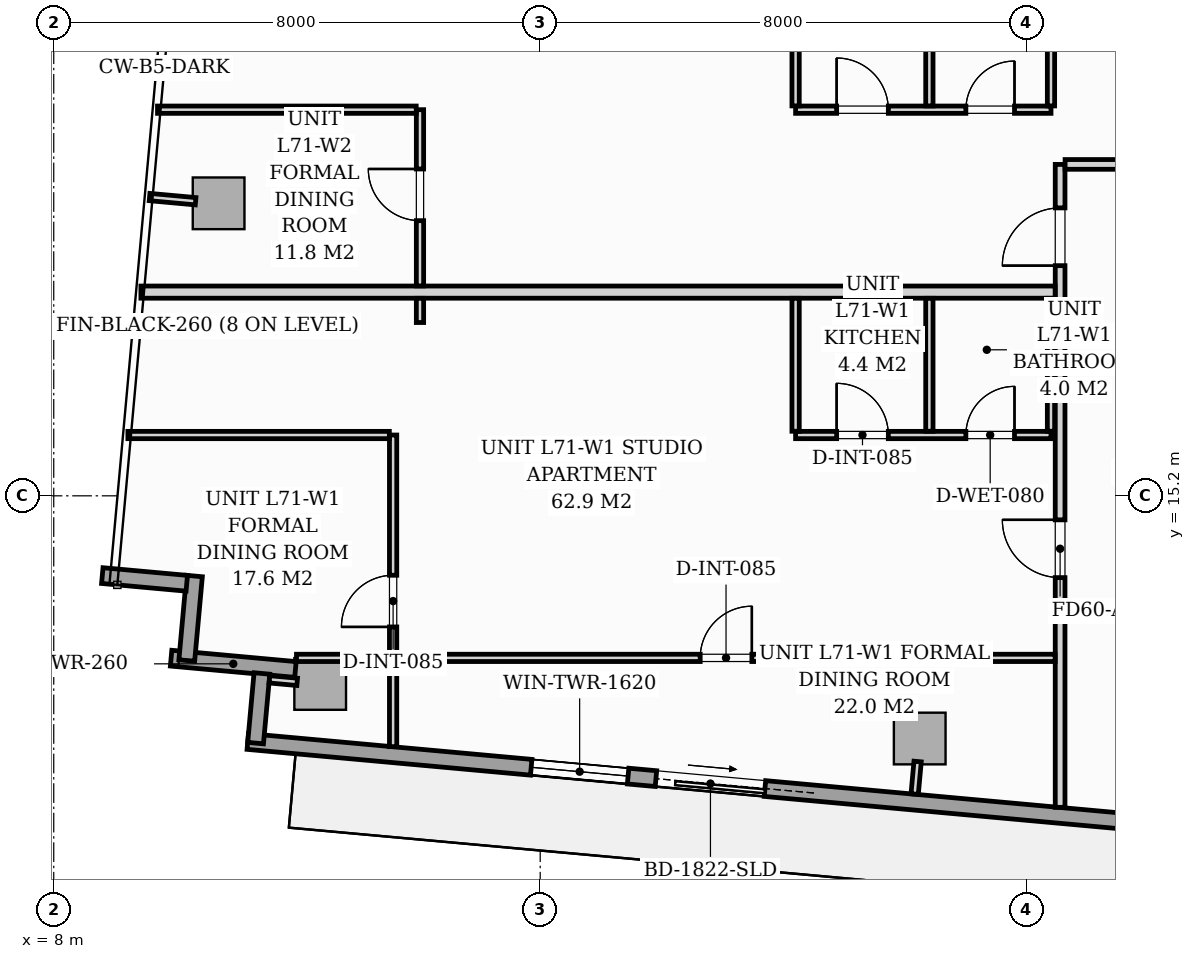
"""IFC4 building model, lengths in metres.
Left out: names, types, materials, properties, quantities, classifications, styles, units other than length and angle.
Written with IfcOpenShell. Run it as: python <this file> out.ifc"""

import sys

from ifc_helpers import new_model, si_unit, direction, frame, frame_2d, origin, origin_2d, place, context, subcontext, project, spatial, rectangle, extrude, source, transform, mapped, element, fill, save


model = new_model("IFC4")
c1 = context("Model", 3, precision=1e-05, world=origin(), true_north=direction((0.0, 1.0)))
c2 = subcontext(c1, "Body", "Model", "MODEL_VIEW")
j1 = project(units=[si_unit("LENGTHUNIT", "METRE"), si_unit("PLANEANGLEUNIT", "RADIAN")], contexts=[c1])
p1 = place(None, origin())
s1 = spatial("IfcSite", under=j1, at=p1, CompositionType="ELEMENT")
p2 = place(p1, origin())
s2 = spatial("IfcBuilding", under=s1, at=p2, CompositionType="ELEMENT")
p3 = place(p2, frame((0.0, 0.0, 246.3)))
s3 = spatial("IfcBuildingStorey", under=s2, at=p3, CompositionType="ELEMENT", Elevation=246.3)
m1 = source(origin(), c2, "Body", "SweptSolid", [
    extrude(rectangle(XDim=0.85, YDim=0.85, at=origin_2d()), origin(), (0.0, 0.0, 1.0), 3.296),
])
for number, where, z_axis, x_axis in (
    (1, (12.382, 12.106, 0.002), (0.0, 0.0, 1.0), (0.996, -0.091, 0.0)),
    (2, (22.241, 11.209, 0.002), (0.0, 0.0, 1.0), (0.996, -0.091, 0.0)),
    (3, (10.711, 20.01, 0.002), (0.0, 0.0, 1.0), (0.996, -0.091, 0.0)),
):
    element("IfcColumn", number, at=place(p3, frame(where, z_axis=z_axis, x_axis=x_axis)), inside=s3, PredefinedType="COLUMN", context=c2, shape_type="MappedRepresentation", body=[
        mapped(m1, transform((0.0, 0.0, 0.0), scale=1.0)),
    ])
p4 = place(p3, frame((11.975, 12.344, 0.0), z_axis=(0.0, 0.0, 1.0), x_axis=(-0.995885404354, 0.090621528316, 0.0)))
e4 = element("IfcWall", 4, at=p4, inside=s3, PredefinedType="STANDARD", context=c2, shape_type="SweptSolid", body=[
    extrude(rectangle(XDim=2.053, YDim=0.26, at=frame_2d((1.026, 0.0))), origin(), (0.0, 0.0, 1.0), 3.04),
])
p5 = place(p3, frame((10.188, 12.492, 0.0), z_axis=(0.0, 0.0, 1.0), x_axis=(0.090646191665, 0.995883159782, 0.0)))
e5 = element("IfcWall", 5, at=p5, inside=s3, PredefinedType="STANDARD", context=c2, shape_type="SweptSolid", body=[
    extrude(rectangle(XDim=1.395, YDim=0.26, at=frame_2d((0.698, 0.0))), origin(), (0.0, 0.0, 1.0), 3.04),
])
p6 = place(p3, frame((10.188, 13.762, 0.0), z_axis=(0.0, 0.0, 1.0), x_axis=(-0.995881721538, 0.090661991521, 0.0)))
e6 = element("IfcWall", 6, at=p6, inside=s3, PredefinedType="STANDARD", context=c2, shape_type="SweptSolid", body=[
    extrude(rectangle(XDim=1.395, YDim=0.26, at=frame_2d((0.698, 0.0))), origin(), (0.0, 0.0, 1.0), 3.04),
])
p7 = place(p3, frame((25.761, 9.834, 0.0), z_axis=(0.0, 0.0, 1.0), x_axis=(-0.995884584572, 0.090630536861, 0.0)))
e7 = element("IfcWall", 7, at=p7, inside=s3, PredefinedType="STANDARD", context=c2, shape_type="SweptSolid", body=[
    extrude(rectangle(XDim=14.63, YDim=0.26, at=frame_2d((7.315, 0.0))), origin(), (0.0, 0.0, 1.0), 3.04),
])
p8 = place(p7, frame((6.09, 0.0, 0.0)))
e8 = element("IfcOpeningElement", 8, at=p8, cuts=e7, PredefinedType="OPENING", context=c2, shape_type="SweptSolid", body=[
    extrude(rectangle(XDim=1.8, YDim=2.06, at=frame_2d((0.9, 1.03))), frame((0.0, 0.14, 0.0), z_axis=(0.0, -1.0, 0.0), x_axis=(1.0, 0.0, 0.0)), (0.0, 0.0, 1.0), 0.28),
])
p9 = place(p7, frame((8.35, 0.0, 0.65)))
e9 = element("IfcOpeningElement", 9, at=p9, cuts=e7, PredefinedType="OPENING", context=c2, shape_type="SweptSolid", body=[
    extrude(rectangle(XDim=1.6, YDim=1.5, at=frame_2d((0.8, 0.75))), frame((0.0, 0.14, 0.0), z_axis=(0.0, -1.0, 0.0), x_axis=(1.0, 0.0, 0.0)), (0.0, 0.0, 1.0), 0.28),
])
p10 = place(p3, frame((11.319, 11.134, 0.0), z_axis=(0.0, 0.0, 1.0), x_axis=(0.090650594353, 0.995882759035, 0.0)))
e10 = element("IfcWall", 10, at=p10, inside=s3, PredefinedType="STANDARD", context=c2, shape_type="SweptSolid", body=[
    extrude(rectangle(XDim=1.15, YDim=0.26, at=frame_2d((0.575, 0.0))), origin(), (0.0, 0.0, 1.0), 3.04),
])
p11 = place(p3, frame((24.55, 13.28, 0.0), z_axis=(0.0, 0.0, 1.0), x_axis=(1.0, 0.0, 0.0)))
e11 = element("IfcWall", 11, at=p11, inside=s3, PredefinedType="PARTITIONING", context=c2, shape_type="SweptSolid", body=[
    extrude(rectangle(XDim=22.9, YDim=0.16, at=frame_2d((11.45, 0.0))), origin(), (0.0, 0.0, 1.0), 2.556),
])
p12 = place(p11, frame((7.125, 0.0, 0.0)))
e12 = element("IfcOpeningElement", 12, at=p12, cuts=e11, PredefinedType="OPENING", context=c2, shape_type="SweptSolid", body=[
    extrude(rectangle(XDim=0.95, YDim=2.06, at=frame_2d((0.475, 1.03))), frame((0.0, 0.09, 0.0), z_axis=(0.0, -1.0, 0.0), x_axis=(1.0, 0.0, 0.0)), (0.0, 0.0, 1.0), 0.18),
])
p13 = place(p3, frame((24.55, 10.077, 0.0), z_axis=(0.0, 0.0, 1.0), x_axis=(0.0, 1.0, 0.0)))
e13 = element("IfcWall", 13, at=p13, inside=s3, PredefinedType="PARTITIONING", context=c2, shape_type="SweptSolid", body=[
    extrude(rectangle(XDim=3.121, YDim=0.16, at=frame_2d((1.561, 0.0))), origin(), (0.0, 0.0, 1.0), 3.04),
])
p14 = place(p3, frame((24.55, 13.362, 0.0), z_axis=(0.0, 0.0, 1.0), x_axis=(0.0, 1.0, 0.0)))
e14 = element("IfcWall", 14, at=p14, inside=s3, PredefinedType="PARTITIONING", context=c2, shape_type="SweptSolid", body=[
    extrude(rectangle(XDim=7.288, YDim=0.16, at=frame_2d((3.644, 0.0))), origin(), (0.0, 0.0, 1.0), 3.04),
])
p15 = place(p14, frame((0.493, 0.0, 0.0)))
e15 = element("IfcOpeningElement", 15, at=p15, cuts=e14, PredefinedType="OPENING", context=c2, shape_type="SweptSolid", body=[
    extrude(rectangle(XDim=0.95, YDim=2.06, at=frame_2d((0.475, 1.03))), frame((0.0, 0.09, 0.0), z_axis=(0.0, -1.0, 0.0), x_axis=(1.0, 0.0, 0.0)), (0.0, 0.0, 1.0), 0.18),
])
p16 = place(p14, frame((5.623, 0.0, 0.0)))
e16 = element("IfcOpeningElement", 16, at=p16, cuts=e14, PredefinedType="OPENING", context=c2, shape_type="SweptSolid", body=[
    extrude(rectangle(XDim=0.95, YDim=2.06, at=frame_2d((0.475, 1.03))), frame((0.0, 0.09, 0.0), z_axis=(0.0, -1.0, 0.0), x_axis=(1.0, 0.0, 0.0)), (0.0, 0.0, 1.0), 0.18),
])
p17 = place(p3, frame((24.632, 20.65, 0.0), z_axis=(0.0, 0.0, 1.0), x_axis=(1.0, 0.0, 0.0)))
e17 = element("IfcWall", 17, at=p17, inside=s3, PredefinedType="PARTITIONING", context=c2, shape_type="SweptSolid", body=[
    extrude(rectangle(XDim=1.566, YDim=0.16, at=frame_2d((0.783, 0.0))), origin(), (0.0, 0.0, 1.0), 3.04),
])
p18 = place(p3, frame((9.434, 18.55, 0.0), z_axis=(0.0, 0.0, 1.0), x_axis=(1.0, 0.0, 0.0)))
e18 = element("IfcWall", 18, at=p18, inside=s3, PredefinedType="PARTITIONING", context=c2, shape_type="SweptSolid", body=[
    extrude(rectangle(XDim=15.034, YDim=0.2, at=frame_2d((7.517, 0.0))), origin(), (0.0, 0.0, 1.0), 2.381),
])
p19 = place(p3, frame((20.2, 16.2, 0.0), z_axis=(0.0, 0.0, 1.0), x_axis=(1.0, 0.0, 0.0)))
e19 = element("IfcWall", 19, at=p19, inside=s3, PredefinedType="PARTITIONING", context=c2, shape_type="SweptSolid", body=[
    extrude(rectangle(XDim=4.2, YDim=0.12, at=frame_2d((2.1, 0.0))), origin(), (0.0, 0.0, 1.0), 3.04),
])
p20 = place(p19, frame((0.675, 0.0, 0.0)))
e20 = element("IfcOpeningElement", 20, at=p20, cuts=e19, PredefinedType="OPENING", context=c2, shape_type="SweptSolid", body=[
    extrude(rectangle(XDim=0.85, YDim=2.05, at=frame_2d((0.425, 1.025))), frame((0.0, 0.07, 0.0), z_axis=(0.0, -1.0, 0.0), x_axis=(1.0, 0.0, 0.0)), (0.0, 0.0, 1.0), 0.14),
])
p21 = place(p19, frame((2.8, 0.0, 0.0)))
e21 = element("IfcOpeningElement", 21, at=p21, cuts=e19, PredefinedType="OPENING", context=c2, shape_type="SweptSolid", body=[
    extrude(rectangle(XDim=0.8, YDim=2.02, at=frame_2d((0.4, 1.01))), frame((0.0, 0.07, 0.0), z_axis=(0.0, -1.0, 0.0), x_axis=(1.0, 0.0, 0.0)), (0.0, 0.0, 1.0), 0.14),
])
for number, where, z_axis, x_axis in (
    (22, (20.2, 16.262, 0.0), (0.0, 0.0, 1.0), (0.0, 1.0, 0.0)),
    (23, (22.4, 16.262, 0.0), (0.0, 0.0, 1.0), (0.0, 1.0, 0.0)),
    (24, (24.4, 16.262, 0.0), (0.0, 0.0, 1.0), (0.0, 1.0, 0.0)),
):
    element("IfcWall", number, at=place(p3, frame(where, z_axis=z_axis, x_axis=x_axis)), inside=s3, PredefinedType="PARTITIONING", context=c2, shape_type="SweptSolid", body=[
        extrude(rectangle(XDim=2.186, YDim=0.12, at=frame_2d((1.093, 0.0))), origin(), (0.0, 0.0, 1.0), 3.04),
    ])
p22 = place(p3, frame((13.581, 11.075, 0.0), z_axis=(0.0, 0.0, 1.0), x_axis=(0.0, 1.0, 0.0)))
e25 = element("IfcWall", 25, at=p22, inside=s3, PredefinedType="PARTITIONING", context=c2, shape_type="SweptSolid", body=[
    extrude(rectangle(XDim=5.125, YDim=0.12, at=frame_2d((2.562, 0.0))), origin(), (0.0, 0.0, 1.0), 3.04),
])
p23 = place(p22, frame((1.969, 0.0, 0.0)))
e26 = element("IfcOpeningElement", 26, at=p23, cuts=e25, PredefinedType="OPENING", context=c2, shape_type="SweptSolid", body=[
    extrude(rectangle(XDim=0.85, YDim=2.05, at=frame_2d((0.425, 1.025))), frame((0.0, 0.07, 0.0), z_axis=(0.0, -1.0, 0.0), x_axis=(1.0, 0.0, 0.0)), (0.0, 0.0, 1.0), 0.14),
])
p24 = place(p3, frame((9.22, 16.2, 0.0), z_axis=(0.0, 0.0, 1.0), x_axis=(1.0, 0.0, 0.0)))
e27 = element("IfcWall", 27, at=p24, inside=s3, PredefinedType="PARTITIONING", context=c2, shape_type="SweptSolid", body=[
    extrude(rectangle(XDim=4.299, YDim=0.12, at=frame_2d((2.149, 0.0))), origin(), (0.0, 0.0, 1.0), 3.04),
])
p25 = place(p3, frame((11.992, 12.535, 0.0), z_axis=(0.0, 0.0, 1.0), x_axis=(1.0, 0.0, 0.0)))
e28 = element("IfcWall", 28, at=p25, inside=s3, PredefinedType="PARTITIONING", context=c2, shape_type="SweptSolid", body=[
    extrude(rectangle(XDim=1.527, YDim=0.12, at=frame_2d((0.763, 0.0))), origin(), (0.0, 0.0, 1.0), 3.04),
])
p26 = place(p3, frame((13.643, 12.535, 0.0), z_axis=(0.0, 0.0, 1.0), x_axis=(1.0, 0.0, 0.0)))
e29 = element("IfcWall", 29, at=p26, inside=s3, PredefinedType="PARTITIONING", context=c2, shape_type="SweptSolid", body=[
    extrude(rectangle(XDim=10.825, YDim=0.12, at=frame_2d((5.413, 0.0))), origin(), (0.0, 0.0, 1.0), 3.04),
])
p27 = place(p26, frame((4.988, 0.0, 0.0)))
e30 = element("IfcOpeningElement", 30, at=p27, cuts=e29, PredefinedType="OPENING", context=c2, shape_type="SweptSolid", body=[
    extrude(rectangle(XDim=0.85, YDim=2.05, at=frame_2d((0.425, 1.025))), frame((0.0, 0.07, 0.0), z_axis=(0.0, -1.0, 0.0), x_axis=(1.0, 0.0, 0.0)), (0.0, 0.0, 1.0), 0.14),
])
p28 = place(p3, frame((20.2, 21.55, 0.0), z_axis=(0.0, 0.0, 1.0), x_axis=(1.0, 0.0, 0.0)))
e31 = element("IfcWall", 31, at=p28, inside=s3, PredefinedType="PARTITIONING", context=c2, shape_type="SweptSolid", body=[
    extrude(rectangle(XDim=4.2, YDim=0.12, at=frame_2d((2.1, 0.0))), origin(), (0.0, 0.0, 1.0), 3.04),
])
p29 = place(p28, frame((0.675, 0.0, 0.0)))
e32 = element("IfcOpeningElement", 32, at=p29, cuts=e31, PredefinedType="OPENING", context=c2, shape_type="SweptSolid", body=[
    extrude(rectangle(XDim=0.85, YDim=2.05, at=frame_2d((0.425, 1.025))), frame((0.0, 0.07, 0.0), z_axis=(0.0, -1.0, 0.0), x_axis=(1.0, 0.0, 0.0)), (0.0, 0.0, 1.0), 0.14),
])
p30 = place(p28, frame((2.8, 0.0, 0.0)))
e33 = element("IfcOpeningElement", 33, at=p30, cuts=e31, PredefinedType="OPENING", context=c2, shape_type="SweptSolid", body=[
    extrude(rectangle(XDim=0.8, YDim=2.02, at=frame_2d((0.4, 1.01))), frame((0.0, 0.07, 0.0), z_axis=(0.0, -1.0, 0.0), x_axis=(1.0, 0.0, 0.0)), (0.0, 0.0, 1.0), 0.14),
])
for number, where, z_axis, x_axis in (
    (34, (20.2, 21.612, 0.0), (0.0, 0.0, 1.0), (0.0, 1.0, 0.0)),
    (35, (22.4, 21.612, 0.0), (0.0, 0.0, 1.0), (0.0, 1.0, 0.0)),
    (36, (24.4, 21.612, 0.0), (0.0, 0.0, 1.0), (0.0, 1.0, 0.0)),
):
    element("IfcWall", number, at=place(p3, frame(where, z_axis=z_axis, x_axis=x_axis)), inside=s3, PredefinedType="PARTITIONING", context=c2, shape_type="SweptSolid", body=[
        extrude(rectangle(XDim=2.126, YDim=0.12, at=frame_2d((1.063, 0.0))), origin(), (0.0, 0.0, 1.0), 3.04),
    ])
p31 = place(p3, frame((14.023, 18.05, 0.0), z_axis=(0.0, 0.0, 1.0), x_axis=(0.0, 1.0, 0.0)))
e37 = element("IfcWall", 37, at=p31, inside=s3, PredefinedType="PARTITIONING", context=c2, shape_type="SweptSolid", body=[
    extrude(rectangle(XDim=0.398, YDim=0.12, at=frame_2d((0.199, 0.0))), origin(), (0.0, 0.0, 1.0), 3.04),
])
p32 = place(p3, frame((14.023, 18.652, 0.0), z_axis=(0.0, 0.0, 1.0), x_axis=(0.0, 1.0, 0.0)))
e38 = element("IfcWall", 38, at=p32, inside=s3, PredefinedType="PARTITIONING", context=c2, shape_type="SweptSolid", body=[
    extrude(rectangle(XDim=2.898, YDim=0.12, at=frame_2d((1.449, 0.0))), origin(), (0.0, 0.0, 1.0), 3.04),
])
p33 = place(p32, frame((1.073, 0.0, 0.0)))
e39 = element("IfcOpeningElement", 39, at=p33, cuts=e38, PredefinedType="OPENING", context=c2, shape_type="SweptSolid", body=[
    extrude(rectangle(XDim=0.85, YDim=2.05, at=frame_2d((0.425, 1.025))), frame((0.0, 0.07, 0.0), z_axis=(0.0, -1.0, 0.0), x_axis=(1.0, 0.0, 0.0)), (0.0, 0.0, 1.0), 0.14),
])
p34 = place(p3, frame((9.707, 21.55, 0.0), z_axis=(0.0, 0.0, 1.0), x_axis=(1.0, 0.0, 0.0)))
e40 = element("IfcWall", 40, at=p34, inside=s3, PredefinedType="PARTITIONING", context=c2, shape_type="SweptSolid", body=[
    extrude(rectangle(XDim=4.254, YDim=0.12, at=frame_2d((2.127, 0.0))), origin(), (0.0, 0.0, 1.0), 3.04),
])
p35 = place(p3, frame((12.003, 12.141, 0.0), z_axis=(0.0, 0.0, 1.0), x_axis=(-0.995884462012, 0.090631883588, 0.0)))
e41 = element("IfcWall", 41, at=p35, inside=s3, PredefinedType="PARTITIONING", context=c2, shape_type="SweptSolid", body=[
    extrude(rectangle(XDim=0.458, YDim=0.12, at=frame_2d((0.229, 0.0))), origin(), (0.0, 0.0, 1.0), 3.04),
])
p36 = place(p3, frame((22.207, 10.831, 0.0), z_axis=(0.0, 0.0, 1.0), x_axis=(-0.090781299264, -0.995870852924, 0.0)))
e42 = element("IfcWall", 42, at=p36, inside=s3, PredefinedType="PARTITIONING", context=c2, shape_type="SweptSolid", body=[
    extrude(rectangle(XDim=0.538, YDim=0.12, at=frame_2d((0.269, 0.0))), origin(), (0.0, 0.0, 1.0), 3.04),
])
p37 = place(p3, frame((10.333, 20.045, 0.0), z_axis=(0.0, 0.0, 1.0), x_axis=(-0.995890573658, 0.09056470228, 0.0)))
e43 = element("IfcWall", 43, at=p37, inside=s3, PredefinedType="PARTITIONING", context=c2, shape_type="SweptSolid", body=[
    extrude(rectangle(XDim=0.76, YDim=0.12, at=frame_2d((0.38, 0.0))), origin(), (0.0, 0.0, 1.0), 3.04),
])
m2 = source(origin(), c2, "Body", "SweptSolid", [
    extrude(rectangle(XDim=1.8, YDim=2.06, at=frame_2d((0.9, 1.03))), frame((0.0, 0.025, 0.0), z_axis=(0.0, -1.0, 0.0), x_axis=(1.0, 0.0, 0.0)), (0.0, 0.0, 1.0), 0.05),
])
p38 = place(p8, origin())
e44 = element("IfcDoor", 44, at=p38, inside=s3, OperationType="SLIDING_TO_LEFT", PredefinedType="DOOR", context=c2, shape_type="MappedRepresentation", body=[
    mapped(m2, transform((0.0, 0.0, 0.0), scale=1.0)),
])
fill(e8, e44)
m3 = source(origin(), c2, "Body", "SweptSolid", [
    extrude(rectangle(XDim=1.6, YDim=1.5, at=frame_2d((0.8, 0.75))), frame((0.0, 0.03, 0.0), z_axis=(0.0, -1.0, 0.0), x_axis=(1.0, 0.0, 0.0)), (0.0, 0.0, 1.0), 0.06),
])
p39 = place(p9, origin())
e45 = element("IfcWindow", 45, at=p39, inside=s3, PartitioningType="SINGLE_PANEL", PredefinedType="WINDOW", context=c2, shape_type="MappedRepresentation", body=[
    mapped(m3, transform((0.0, 0.0, 0.0), scale=1.0)),
])
fill(e9, e45)
m4 = source(origin(), c2, "Body", "SweptSolid", [
    extrude(rectangle(XDim=0.95, YDim=2.06, at=frame_2d((0.475, 1.03))), frame((0.0, 0.025, 0.0), z_axis=(0.0, -1.0, 0.0), x_axis=(1.0, 0.0, 0.0)), (0.0, 0.0, 1.0), 0.05),
])
p40 = place(p15, origin())
e46 = element("IfcDoor", 46, at=p40, inside=s3, OperationType="SINGLE_SWING_RIGHT", PredefinedType="DOOR", context=c2, shape_type="MappedRepresentation", body=[
    mapped(m4, transform((0.0, 0.0, 0.0), scale=1.0)),
])
fill(e15, e46)
m5 = source(origin(), c2, "Body", "SweptSolid", [
    extrude(rectangle(XDim=0.85, YDim=2.05, at=frame_2d((0.425, 1.025))), frame((0.0, 0.025, 0.0), z_axis=(0.0, -1.0, 0.0), x_axis=(1.0, 0.0, 0.0)), (0.0, 0.0, 1.0), 0.05),
])
p41 = place(p23, origin())
e47 = element("IfcDoor", 47, at=p41, inside=s3, OperationType="SINGLE_SWING_LEFT", PredefinedType="DOOR", context=c2, shape_type="MappedRepresentation", body=[
    mapped(m5, transform((0.0, 0.0, 0.0), scale=1.0)),
])
fill(e26, e47)
p42 = place(p27, origin())
e48 = element("IfcDoor", 48, at=p42, inside=s3, OperationType="SINGLE_SWING_RIGHT", PredefinedType="DOOR", context=c2, shape_type="MappedRepresentation", body=[
    mapped(m5, transform((0.0, 0.0, 0.0), scale=1.0)),
])
fill(e30, e48)
p43 = place(p20, origin())
e49 = element("IfcDoor", 49, at=p43, inside=s3, OperationType="SINGLE_SWING_LEFT", PredefinedType="DOOR", context=c2, shape_type="MappedRepresentation", body=[
    mapped(m5, transform((0.0, 0.0, 0.0), scale=1.0)),
])
fill(e20, e49)
m6 = source(origin(), c2, "Body", "SweptSolid", [
    extrude(rectangle(XDim=0.8, YDim=2.02, at=frame_2d((0.4, 1.01))), frame((0.0, 0.025, 0.0), z_axis=(0.0, -1.0, 0.0), x_axis=(1.0, 0.0, 0.0)), (0.0, 0.0, 1.0), 0.05),
])
p44 = place(p21, origin())
e50 = element("IfcDoor", 50, at=p44, inside=s3, OperationType="SINGLE_SWING_RIGHT", PredefinedType="DOOR", context=c2, shape_type="MappedRepresentation", body=[
    mapped(m6, transform((0.0, 0.0, 0.0), scale=1.0)),
])
fill(e21, e50)
p45 = place(p16, origin())
e51 = element("IfcDoor", 51, at=p45, inside=s3, OperationType="SINGLE_SWING_LEFT", PredefinedType="DOOR", context=c2, shape_type="MappedRepresentation", body=[
    mapped(m4, transform((0.0, 0.0, 0.0), scale=1.0)),
])
fill(e16, e51)
p46 = place(p33, origin())
e52 = element("IfcDoor", 52, at=p46, inside=s3, OperationType="SINGLE_SWING_RIGHT", PredefinedType="DOOR", context=c2, shape_type="MappedRepresentation", body=[
    mapped(m5, transform((0.0, 0.0, 0.0), scale=1.0)),
])
fill(e39, e52)
p47 = place(p29, origin())
e53 = element("IfcDoor", 53, at=p47, inside=s3, OperationType="SINGLE_SWING_LEFT", PredefinedType="DOOR", context=c2, shape_type="MappedRepresentation", body=[
    mapped(m5, transform((0.0, 0.0, 0.0), scale=1.0)),
])
fill(e32, e53)
p48 = place(p30, origin())
e54 = element("IfcDoor", 54, at=p48, inside=s3, OperationType="SINGLE_SWING_RIGHT", PredefinedType="DOOR", context=c2, shape_type="MappedRepresentation", body=[
    mapped(m6, transform((0.0, 0.0, 0.0), scale=1.0)),
])
fill(e33, e54)
save(model, sys.argv[1])
